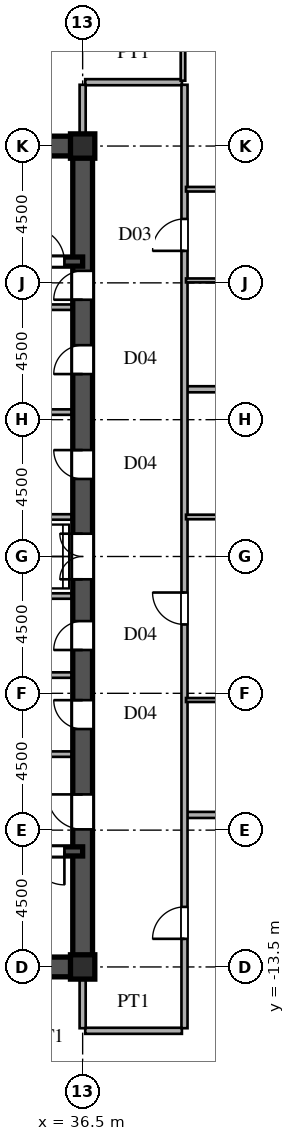
"""IFC4 building model, lengths in metres.
Left out: names, types, materials, properties, quantities, classifications, styles, units other than length and angle.
Written with IfcOpenShell. Run it as: python <this file> out.ifc"""

import sys

from ifc_helpers import new_model, si_unit, direction, frame, frame_2d, origin, origin_2d, place, context, subcontext, project, spatial, rectangle, i_section, extrude, source, transform, mapped, element, fill, save


model = new_model("IFC4")
c1 = context("Model", 3, precision=1e-05, world=origin(), true_north=direction((0.0, 1.0)))
c2 = subcontext(c1, "Body", "Model", "MODEL_VIEW")
j1 = project(units=[si_unit("LENGTHUNIT", "METRE"), si_unit("PLANEANGLEUNIT", "RADIAN")], contexts=[c1])
p1 = place(None, origin())
s1 = spatial("IfcSite", under=j1, at=p1, CompositionType="ELEMENT")
p2 = place(p1, origin())
s2 = spatial("IfcBuilding", under=s1, at=p2, CompositionType="ELEMENT")
p3 = place(p2, frame((0.0, 0.0, 72.9)))
s3 = spatial("IfcBuildingStorey", under=s2, at=p3, CompositionType="ELEMENT", Elevation=72.9)
m1 = source(origin(), c2, "Body", "SweptSolid", [
    extrude(i_section(OverallWidth=0.8, OverallDepth=0.8, WebThickness=0.032, FlangeThickness=0.05, at=origin_2d()), origin(), (0.0, 0.0, 1.0), 3.6),
])
for number, where, z_axis, x_axis in (
    (1, (36.5, -13.5, 0.0), (0.0, 0.0, 1.0), (1.0, 0.0, 0.0)),
    (2, (36.5, 13.5, 0.0), (0.0, 0.0, 1.0), (1.0, 0.0, 0.0)),
):
    element("IfcColumn", number, at=place(p3, frame(where, z_axis=z_axis, x_axis=x_axis)), inside=s3, PredefinedType="COLUMN", context=c2, shape_type="MappedRepresentation", body=[
        mapped(m1, transform((0.0, 0.0, 0.0), scale=1.0)),
    ])
for number, where, z_axis, x_axis in (
    (3, (27.5, -13.5, 0.0), (0.0, 0.0, 1.0), (1.0, 0.0, 0.0)),
    (4, (27.5, 13.5, 0.0), (0.0, 0.0, 1.0), (1.0, 0.0, 0.0)),
):
    element("IfcWall", number, at=place(p3, frame(where, z_axis=z_axis, x_axis=x_axis)), inside=s3, PredefinedType="SHEAR", context=c2, shape_type="SweptSolid", body=[
        extrude(rectangle(XDim=9.0, YDim=0.65, at=frame_2d((4.5, 0.0))), origin(), (0.0, 0.0, 1.0), 3.38),
    ])
p4 = place(p3, frame((36.5, -13.65, 0.0), z_axis=(0.0, 0.0, 1.0), x_axis=(0.0, 1.0, 0.0)))
e5 = element("IfcWall", 5, at=p4, inside=s3, PredefinedType="SHEAR", context=c2, shape_type="SweptSolid", body=[
    extrude(rectangle(XDim=7.15, YDim=0.65, at=frame_2d((3.575, 0.0))), origin(), (0.0, 0.0, 1.0), 3.38),
])
p5 = place(p4, frame((4.675, 0.0, 0.0)))
e6 = element("IfcOpeningElement", 6, at=p5, cuts=e5, PredefinedType="OPENING", context=c2, shape_type="SweptSolid", body=[
    extrude(rectangle(XDim=1.15, YDim=2.2, at=frame_2d((0.575, 1.1))), frame((0.0, 0.335, 0.0), z_axis=(0.0, -1.0, 0.0), x_axis=(1.0, 0.0, 0.0)), (0.0, 0.0, 1.0), 0.67),
])
p6 = place(p3, frame((36.5, -1.3, 0.0), z_axis=(0.0, 0.0, 1.0), x_axis=(0.0, 1.0, 0.0)))
e7 = element("IfcWall", 7, at=p6, inside=s3, PredefinedType="SHEAR", context=c2, shape_type="SweptSolid", body=[
    extrude(rectangle(XDim=2.6, YDim=0.65, at=frame_2d((1.3, 0.0))), origin(), (0.0, 0.0, 1.0), 3.38),
])
p7 = place(p6, frame((0.55, 0.0, 0.0)))
e8 = element("IfcOpeningElement", 8, at=p7, cuts=e7, PredefinedType="OPENING", context=c2, shape_type="SweptSolid", body=[
    extrude(rectangle(XDim=1.5, YDim=2.3, at=frame_2d((0.75, 1.15))), frame((0.0, 0.335, 0.0), z_axis=(0.0, -1.0, 0.0), x_axis=(1.0, 0.0, 0.0)), (0.0, 0.0, 1.0), 0.67),
])
p8 = place(p3, frame((36.5, 8.2, 0.0), z_axis=(0.0, 0.0, 1.0), x_axis=(0.0, 1.0, 0.0)))
e9 = element("IfcWall", 9, at=p8, inside=s3, PredefinedType="SHEAR", context=c2, shape_type="SweptSolid", body=[
    extrude(rectangle(XDim=5.45, YDim=0.65, at=frame_2d((2.725, 0.0))), origin(), (0.0, 0.0, 1.0), 3.38),
])
p9 = place(p8, frame((0.245, 0.0, 0.0)))
e10 = element("IfcOpeningElement", 10, at=p9, cuts=e9, PredefinedType="OPENING", context=c2, shape_type="SweptSolid", body=[
    extrude(rectangle(XDim=0.95, YDim=2.15, at=frame_2d((0.475, 1.075))), frame((0.0, 0.335, 0.0), z_axis=(0.0, -1.0, 0.0), x_axis=(1.0, 0.0, 0.0)), (0.0, 0.0, 1.0), 0.67),
])
p10 = place(p3, frame((36.5, -6.5, 0.0), z_axis=(0.0, 0.0, 1.0), x_axis=(0.0, 1.0, 0.0)))
e11 = element("IfcWall", 11, at=p10, inside=s3, PredefinedType="SHEAR", context=c2, shape_type="SweptSolid", body=[
    extrude(rectangle(XDim=2.6, YDim=0.65, at=frame_2d((1.3, 0.0))), origin(), (0.0, 0.0, 1.0), 3.38),
])
p11 = place(p10, frame((0.825, 0.0, 0.0)))
e12 = element("IfcOpeningElement", 12, at=p11, cuts=e11, PredefinedType="OPENING", context=c2, shape_type="SweptSolid", body=[
    extrude(rectangle(XDim=0.95, YDim=2.15, at=frame_2d((0.475, 1.075))), frame((0.0, 0.335, 0.0), z_axis=(0.0, -1.0, 0.0), x_axis=(1.0, 0.0, 0.0)), (0.0, 0.0, 1.0), 0.67),
])
p12 = place(p3, frame((36.5, -3.9, 0.0), z_axis=(0.0, 0.0, 1.0), x_axis=(0.0, 1.0, 0.0)))
e13 = element("IfcWall", 13, at=p12, inside=s3, PredefinedType="SHEAR", context=c2, shape_type="SweptSolid", body=[
    extrude(rectangle(XDim=2.6, YDim=0.65, at=frame_2d((1.3, 0.0))), origin(), (0.0, 0.0, 1.0), 3.38),
])
p13 = place(p12, frame((0.825, 0.0, 0.0)))
e14 = element("IfcOpeningElement", 14, at=p13, cuts=e13, PredefinedType="OPENING", context=c2, shape_type="SweptSolid", body=[
    extrude(rectangle(XDim=0.95, YDim=2.15, at=frame_2d((0.475, 1.075))), frame((0.0, 0.335, 0.0), z_axis=(0.0, -1.0, 0.0), x_axis=(1.0, 0.0, 0.0)), (0.0, 0.0, 1.0), 0.67),
])
p14 = place(p3, frame((36.5, 1.3, 0.0), z_axis=(0.0, 0.0, 1.0), x_axis=(0.0, 1.0, 0.0)))
e15 = element("IfcWall", 15, at=p14, inside=s3, PredefinedType="SHEAR", context=c2, shape_type="SweptSolid", body=[
    extrude(rectangle(XDim=3.45, YDim=0.65, at=frame_2d((1.725, 0.0))), origin(), (0.0, 0.0, 1.0), 3.38),
])
p15 = place(p14, frame((1.25, 0.0, 0.0)))
e16 = element("IfcOpeningElement", 16, at=p15, cuts=e15, PredefinedType="OPENING", context=c2, shape_type="SweptSolid", body=[
    extrude(rectangle(XDim=0.95, YDim=2.15, at=frame_2d((0.475, 1.075))), frame((0.0, 0.335, 0.0), z_axis=(0.0, -1.0, 0.0), x_axis=(1.0, 0.0, 0.0)), (0.0, 0.0, 1.0), 0.67),
])
p16 = place(p3, frame((36.5, 4.75, 0.0), z_axis=(0.0, 0.0, 1.0), x_axis=(0.0, 1.0, 0.0)))
e17 = element("IfcWall", 17, at=p16, inside=s3, PredefinedType="SHEAR", context=c2, shape_type="SweptSolid", body=[
    extrude(rectangle(XDim=3.45, YDim=0.65, at=frame_2d((1.725, 0.0))), origin(), (0.0, 0.0, 1.0), 3.38),
])
p17 = place(p16, frame((1.25, 0.0, 0.0)))
e18 = element("IfcOpeningElement", 18, at=p17, cuts=e17, PredefinedType="OPENING", context=c2, shape_type="SweptSolid", body=[
    extrude(rectangle(XDim=0.95, YDim=2.15, at=frame_2d((0.475, 1.075))), frame((0.0, 0.335, 0.0), z_axis=(0.0, -1.0, 0.0), x_axis=(1.0, 0.0, 0.0)), (0.0, 0.0, 1.0), 0.67),
])
p18 = place(p3, frame((27.5, -9.7, 0.0), z_axis=(0.0, 0.0, 1.0), x_axis=(1.0, 0.0, 0.0)))
e19 = element("IfcWall", 19, at=p18, inside=s3, PredefinedType="SHEAR", context=c2, shape_type="SweptSolid", body=[
    extrude(rectangle(XDim=9.0, YDim=0.3, at=frame_2d((4.5, 0.0))), origin(), (0.0, 0.0, 1.0), 3.38),
])
p19 = place(p18, frame((7.3, 0.0, 0.0)))
e20 = element("IfcOpeningElement", 20, at=p19, cuts=e19, PredefinedType="OPENING", context=c2, shape_type="SweptSolid", body=[
    extrude(rectangle(XDim=1.1, YDim=2.2, at=frame_2d((0.55, 1.1))), frame((0.0, 0.16, 0.0), z_axis=(0.0, -1.0, 0.0), x_axis=(1.0, 0.0, 0.0)), (0.0, 0.0, 1.0), 0.32),
])
p20 = place(p3, frame((27.5, 9.7, 0.0), z_axis=(0.0, 0.0, 1.0), x_axis=(1.0, 0.0, 0.0)))
e21 = element("IfcWall", 21, at=p20, inside=s3, PredefinedType="SHEAR", context=c2, shape_type="SweptSolid", body=[
    extrude(rectangle(XDim=9.0, YDim=0.3, at=frame_2d((4.5, 0.0))), origin(), (0.0, 0.0, 1.0), 3.38),
])
p21 = place(p20, frame((7.3, 0.0, 0.0)))
e22 = element("IfcOpeningElement", 22, at=p21, cuts=e21, PredefinedType="OPENING", context=c2, shape_type="SweptSolid", body=[
    extrude(rectangle(XDim=1.1, YDim=2.2, at=frame_2d((0.55, 1.1))), frame((0.0, 0.16, 0.0), z_axis=(0.0, -1.0, 0.0), x_axis=(1.0, 0.0, 0.0)), (0.0, 0.0, 1.0), 0.32),
])
for number, where, z_axis, x_axis in (
    (23, (30.45, -6.5, 0.0), (0.0, 0.0, 1.0), (1.0, 0.0, 0.0)),
    (24, (30.45, 8.2, 0.0), (0.0, 0.0, 1.0), (1.0, 0.0, 0.0)),
):
    element("IfcWall", number, at=place(p3, frame(where, z_axis=z_axis, x_axis=x_axis)), inside=s3, PredefinedType="PARTITIONING", context=c2, shape_type="SweptSolid", body=[
        extrude(rectangle(XDim=5.7, YDim=0.18, at=frame_2d((2.85, 0.0))), origin(), (0.0, 0.0, 1.0), 3.38),
    ])
for number, where, z_axis, x_axis in (
    (25, (33.2, -1.3, 0.0), (0.0, 0.0, 1.0), (1.0, 0.0, 0.0)),
    (26, (33.2, 1.3, 0.0), (0.0, 0.0, 1.0), (1.0, 0.0, 0.0)),
    (27, (33.2, -3.9, 0.0), (0.0, 0.0, 1.0), (1.0, 0.0, 0.0)),
    (28, (33.2, 4.75, 0.0), (0.0, 0.0, 1.0), (1.0, 0.0, 0.0)),
):
    element("IfcWall", number, at=place(p3, frame(where, z_axis=z_axis, x_axis=x_axis)), inside=s3, PredefinedType="PARTITIONING", context=c2, shape_type="SweptSolid", body=[
        extrude(rectangle(XDim=2.95, YDim=0.18, at=frame_2d((1.475, 0.0))), origin(), (0.0, 0.0, 1.0), 3.38),
    ])
p22 = place(p3, frame((36.585, -15.6, 0.0), z_axis=(0.0, 0.0, 1.0), x_axis=(1.0, 0.0, 0.0)))
e29 = element("IfcWall", 29, at=p22, inside=s3, PredefinedType="PARTITIONING", context=c2, shape_type="SweptSolid", body=[
    extrude(rectangle(XDim=3.18, YDim=0.2, at=frame_2d((1.59, 0.0))), origin(), (0.0, 0.0, 1.0), 3.38),
])
p23 = place(p3, frame((39.93, -8.5, 0.0), z_axis=(0.0, 0.0, 1.0), x_axis=(1.0, 0.0, 0.0)))
e30 = element("IfcWall", 30, at=p23, inside=s3, PredefinedType="PARTITIONING", context=c2, shape_type="SweptSolid", body=[
    extrude(rectangle(XDim=28.86, YDim=0.2, at=frame_2d((14.43, 0.0))), origin(), (0.0, 0.0, 1.0), 3.38),
])
p24 = place(p3, frame((39.9, -4.72, 0.0), z_axis=(0.0, 0.0, 1.0), x_axis=(1.0, 0.0, 0.0)))
e31 = element("IfcWall", 31, at=p24, inside=s3, PredefinedType="PARTITIONING", context=c2, shape_type="SweptSolid", body=[
    extrude(rectangle(XDim=5.55, YDim=0.13, at=frame_2d((2.775, 0.0))), origin(), (0.0, 0.0, 1.0), 3.38),
])
p25 = place(p24, frame((2.335, 0.0, 0.0)))
e32 = element("IfcOpeningElement", 32, at=p25, cuts=e31, PredefinedType="OPENING", context=c2, shape_type="SweptSolid", body=[
    extrude(rectangle(XDim=0.88, YDim=2.1, at=frame_2d((0.44, 1.05))), frame((0.0, 0.075, 0.0), z_axis=(0.0, -1.0, 0.0), x_axis=(1.0, 0.0, 0.0)), (0.0, 0.0, 1.0), 0.15),
])
p26 = place(p3, frame((39.9, 1.3, 0.0), z_axis=(0.0, 0.0, 1.0), x_axis=(1.0, 0.0, 0.0)))
e33 = element("IfcWall", 33, at=p26, inside=s3, PredefinedType="PARTITIONING", context=c2, shape_type="SweptSolid", body=[
    extrude(rectangle(XDim=5.55, YDim=0.15, at=frame_2d((2.775, 0.0))), origin(), (0.0, 0.0, 1.0), 3.38),
])
p27 = place(p26, frame((2.3, 0.0, 0.0)))
e34 = element("IfcOpeningElement", 34, at=p27, cuts=e33, PredefinedType="OPENING", context=c2, shape_type="SweptSolid", body=[
    extrude(rectangle(XDim=0.95, YDim=2.15, at=frame_2d((0.475, 1.075))), frame((0.0, 0.085, 0.0), z_axis=(0.0, -1.0, 0.0), x_axis=(1.0, 0.0, 0.0)), (0.0, 0.0, 1.0), 0.17),
])
p28 = place(p3, frame((39.93, 5.5, 0.0), z_axis=(0.0, 0.0, 1.0), x_axis=(1.0, 0.0, 0.0)))
e35 = element("IfcWall", 35, at=p28, inside=s3, PredefinedType="PARTITIONING", context=c2, shape_type="SweptSolid", body=[
    extrude(rectangle(XDim=31.075, YDim=0.2, at=frame_2d((15.538, 0.0))), origin(), (0.0, 0.0, 1.0), 3.38),
])
p29 = place(p3, frame((39.9, 9.08, 0.0), z_axis=(0.0, 0.0, 1.0), x_axis=(1.0, 0.0, 0.0)))
e36 = element("IfcWall", 36, at=p29, inside=s3, PredefinedType="PARTITIONING", context=c2, shape_type="SweptSolid", body=[
    extrude(rectangle(XDim=5.55, YDim=0.13, at=frame_2d((2.775, 0.0))), origin(), (0.0, 0.0, 1.0), 3.38),
])
p30 = place(p29, frame((2.335, 0.0, 0.0)))
e37 = element("IfcOpeningElement", 37, at=p30, cuts=e36, PredefinedType="OPENING", context=c2, shape_type="SweptSolid", body=[
    extrude(rectangle(XDim=0.88, YDim=2.1, at=frame_2d((0.44, 1.05))), frame((0.0, 0.075, 0.0), z_axis=(0.0, -1.0, 0.0), x_axis=(1.0, 0.0, 0.0)), (0.0, 0.0, 1.0), 0.15),
])
p31 = place(p3, frame((39.9, 12.08, 0.0), z_axis=(0.0, 0.0, 1.0), x_axis=(1.0, 0.0, 0.0)))
e38 = element("IfcWall", 38, at=p31, inside=s3, PredefinedType="PARTITIONING", context=c2, shape_type="SweptSolid", body=[
    extrude(rectangle(XDim=5.55, YDim=0.15, at=frame_2d((2.775, 0.0))), origin(), (0.0, 0.0, 1.0), 3.38),
])
p32 = place(p31, frame((2.3, 0.0, 0.0)))
e39 = element("IfcOpeningElement", 39, at=p32, cuts=e38, PredefinedType="OPENING", context=c2, shape_type="SweptSolid", body=[
    extrude(rectangle(XDim=0.95, YDim=2.15, at=frame_2d((0.475, 1.075))), frame((0.0, 0.085, 0.0), z_axis=(0.0, -1.0, 0.0), x_axis=(1.0, 0.0, 0.0)), (0.0, 0.0, 1.0), 0.17),
])
p33 = place(p3, frame((36.585, 15.6, 0.0), z_axis=(0.0, 0.0, 1.0), x_axis=(1.0, 0.0, 0.0)))
e40 = element("IfcWall", 40, at=p33, inside=s3, PredefinedType="PARTITIONING", context=c2, shape_type="SweptSolid", body=[
    extrude(rectangle(XDim=3.18, YDim=0.2, at=frame_2d((1.59, 0.0))), origin(), (0.0, 0.0, 1.0), 3.38),
])
for number, where, z_axis, x_axis in (
    (41, (36.5, -15.515, 0.0), (0.0, 0.0, 1.0), (0.0, 1.0, 0.0)),
    (42, (36.5, 13.83, 0.0), (0.0, 0.0, 1.0), (0.0, 1.0, 0.0)),
):
    element("IfcWall", number, at=place(p3, frame(where, z_axis=z_axis, x_axis=x_axis)), inside=s3, PredefinedType="PARTITIONING", context=c2, shape_type="SweptSolid", body=[
        extrude(rectangle(XDim=1.685, YDim=0.2, at=frame_2d((0.842, 0.0))), origin(), (0.0, 0.0, 1.0), 2.68),
    ])
p34 = place(p3, frame((39.8, 15.65, 0.0), z_axis=(0.0, 0.0, 1.0), x_axis=(0.0, 1.0, 0.0)))
e43 = element("IfcWall", 43, at=p34, inside=s3, PredefinedType="PARTITIONING", context=c2, shape_type="SweptSolid", body=[
    extrude(rectangle(XDim=5.925, YDim=0.15, at=frame_2d((2.962, 0.0))), origin(), (0.0, 0.0, 1.0), 3.38),
])
p35 = place(p34, frame((2.029, 0.0, 0.0)))
e44 = element("IfcOpeningElement", 44, at=p35, cuts=e43, PredefinedType="OPENING", context=c2, shape_type="SweptSolid", body=[
    extrude(rectangle(XDim=0.95, YDim=2.15, at=frame_2d((0.475, 1.075))), frame((0.0, 0.085, 0.0), z_axis=(0.0, -1.0, 0.0), x_axis=(1.0, 0.0, 0.0)), (0.0, 0.0, 1.0), 0.17),
])
p36 = place(p3, frame((39.85, -15.515, 0.0), z_axis=(0.0, 0.0, 1.0), x_axis=(0.0, 1.0, 0.0)))
e45 = element("IfcWall", 45, at=p36, inside=s3, PredefinedType="PARTITIONING", context=c2, shape_type="SweptSolid", body=[
    extrude(rectangle(XDim=31.03, YDim=0.2, at=frame_2d((15.515, 0.0))), origin(), (0.0, 0.0, 1.0), 3.38),
])
p37 = place(p36, frame((2.94, 0.0, 0.0)))
e46 = element("IfcOpeningElement", 46, at=p37, cuts=e45, PredefinedType="OPENING", context=c2, shape_type="SweptSolid", body=[
    extrude(rectangle(XDim=1.05, YDim=2.25, at=frame_2d((0.525, 1.125))), frame((0.0, 0.11, 0.0), z_axis=(0.0, -1.0, 0.0), x_axis=(1.0, 0.0, 0.0)), (0.0, 0.0, 1.0), 0.22),
])
p38 = place(p36, frame((13.28, 0.0, 0.0)))
e47 = element("IfcOpeningElement", 47, at=p38, cuts=e45, PredefinedType="OPENING", context=c2, shape_type="SweptSolid", body=[
    extrude(rectangle(XDim=1.05, YDim=2.25, at=frame_2d((0.525, 1.125))), frame((0.0, 0.11, 0.0), z_axis=(0.0, -1.0, 0.0), x_axis=(1.0, 0.0, 0.0)), (0.0, 0.0, 1.0), 0.22),
])
p39 = place(p36, frame((25.567, 0.0, 0.0)))
e48 = element("IfcOpeningElement", 48, at=p39, cuts=e45, PredefinedType="OPENING", context=c2, shape_type="SweptSolid", body=[
    extrude(rectangle(XDim=1.05, YDim=2.25, at=frame_2d((0.525, 1.125))), frame((0.0, 0.11, 0.0), z_axis=(0.0, -1.0, 0.0), x_axis=(1.0, 0.0, 0.0)), (0.0, 0.0, 1.0), 0.22),
])
m2 = source(origin(), c2, "Body", "SweptSolid", [
    extrude(rectangle(XDim=1.15, YDim=2.2, at=frame_2d((0.575, 1.1))), frame((0.0, 0.025, 0.0), z_axis=(0.0, -1.0, 0.0), x_axis=(1.0, 0.0, 0.0)), (0.0, 0.0, 1.0), 0.05),
])
p40 = place(p5, origin())
e49 = element("IfcDoor", 49, at=p40, inside=s3, OperationType="SINGLE_SWING_RIGHT", PredefinedType="DOOR", context=c2, shape_type="MappedRepresentation", body=[
    mapped(m2, transform((0.0, 0.0, 0.0), scale=1.0)),
])
fill(e6, e49)
m3 = source(origin(), c2, "Body", "SweptSolid", [
    extrude(rectangle(XDim=1.5, YDim=2.3, at=frame_2d((0.75, 1.15))), frame((0.0, 0.025, 0.0), z_axis=(0.0, -1.0, 0.0), x_axis=(1.0, 0.0, 0.0)), (0.0, 0.0, 1.0), 0.05),
])
p41 = place(p7, origin())
e50 = element("IfcDoor", 50, at=p41, inside=s3, OperationType="DOUBLE_SWING_LEFT", PredefinedType="DOOR", context=c2, shape_type="MappedRepresentation", body=[
    mapped(m3, transform((0.0, 0.0, 0.0), scale=1.0)),
])
fill(e8, e50)
m4 = source(origin(), c2, "Body", "SweptSolid", [
    extrude(rectangle(XDim=0.95, YDim=2.15, at=frame_2d((0.475, 1.075))), frame((0.0, 0.025, 0.0), z_axis=(0.0, -1.0, 0.0), x_axis=(1.0, 0.0, 0.0)), (0.0, 0.0, 1.0), 0.05),
])
p42 = place(p9, origin())
e51 = element("IfcDoor", 51, at=p42, inside=s3, OperationType="SINGLE_SWING_LEFT", PredefinedType="DOOR", context=c2, shape_type="MappedRepresentation", body=[
    mapped(m4, transform((0.0, 0.0, 0.0), scale=1.0)),
])
fill(e10, e51)
p43 = place(p11, origin())
e52 = element("IfcDoor", 52, at=p43, inside=s3, OperationType="SINGLE_SWING_RIGHT", PredefinedType="DOOR", context=c2, shape_type="MappedRepresentation", body=[
    mapped(m4, transform((0.0, 0.0, 0.0), scale=1.0)),
])
fill(e12, e52)
p44 = place(p13, origin())
e53 = element("IfcDoor", 53, at=p44, inside=s3, OperationType="SINGLE_SWING_LEFT", PredefinedType="DOOR", context=c2, shape_type="MappedRepresentation", body=[
    mapped(m4, transform((0.0, 0.0, 0.0), scale=1.0)),
])
fill(e14, e53)
p45 = place(p15, origin())
e54 = element("IfcDoor", 54, at=p45, inside=s3, OperationType="SINGLE_SWING_RIGHT", PredefinedType="DOOR", context=c2, shape_type="MappedRepresentation", body=[
    mapped(m4, transform((0.0, 0.0, 0.0), scale=1.0)),
])
fill(e16, e54)
p46 = place(p17, origin())
e55 = element("IfcDoor", 55, at=p46, inside=s3, OperationType="SINGLE_SWING_LEFT", PredefinedType="DOOR", context=c2, shape_type="MappedRepresentation", body=[
    mapped(m4, transform((0.0, 0.0, 0.0), scale=1.0)),
])
fill(e18, e55)
m5 = source(origin(), c2, "Body", "SweptSolid", [
    extrude(rectangle(XDim=1.1, YDim=2.2, at=frame_2d((0.55, 1.1))), frame((0.0, 0.025, 0.0), z_axis=(0.0, -1.0, 0.0), x_axis=(1.0, 0.0, 0.0)), (0.0, 0.0, 1.0), 0.05),
])
p47 = place(p19, frame((1.1, 0.0, 0.0), z_axis=(0.0, 0.0, 1.0), x_axis=(-1.0, 0.0, 0.0)))
e56 = element("IfcDoor", 56, at=p47, inside=s3, OperationType="SINGLE_SWING_RIGHT", PredefinedType="DOOR", context=c2, shape_type="MappedRepresentation", body=[
    mapped(m5, transform((0.0, 0.0, 0.0), scale=1.0)),
])
fill(e20, e56)
p48 = place(p21, origin())
e57 = element("IfcDoor", 57, at=p48, inside=s3, OperationType="SINGLE_SWING_LEFT", PredefinedType="DOOR", context=c2, shape_type="MappedRepresentation", body=[
    mapped(m5, transform((0.0, 0.0, 0.0), scale=1.0)),
])
fill(e22, e57)
m6 = source(origin(), c2, "Body", "SweptSolid", [
    extrude(rectangle(XDim=1.05, YDim=2.25, at=frame_2d((0.525, 1.125))), frame((0.0, 0.025, 0.0), z_axis=(0.0, -1.0, 0.0), x_axis=(1.0, 0.0, 0.0)), (0.0, 0.0, 1.0), 0.05),
])
p49 = place(p37, origin())
e58 = element("IfcDoor", 58, at=p49, inside=s3, OperationType="SINGLE_SWING_LEFT", PredefinedType="DOOR", context=c2, shape_type="MappedRepresentation", body=[
    mapped(m6, transform((0.0, 0.0, 0.0), scale=1.0)),
])
fill(e46, e58)
p50 = place(p38, origin())
e59 = element("IfcDoor", 59, at=p50, inside=s3, OperationType="SINGLE_SWING_RIGHT", PredefinedType="DOOR", context=c2, shape_type="MappedRepresentation", body=[
    mapped(m6, transform((0.0, 0.0, 0.0), scale=1.0)),
])
fill(e47, e59)
p51 = place(p39, origin())
e60 = element("IfcDoor", 60, at=p51, inside=s3, OperationType="SINGLE_SWING_LEFT", PredefinedType="DOOR", context=c2, shape_type="MappedRepresentation", body=[
    mapped(m6, transform((0.0, 0.0, 0.0), scale=1.0)),
])
fill(e48, e60)
save(model, sys.argv[1])
